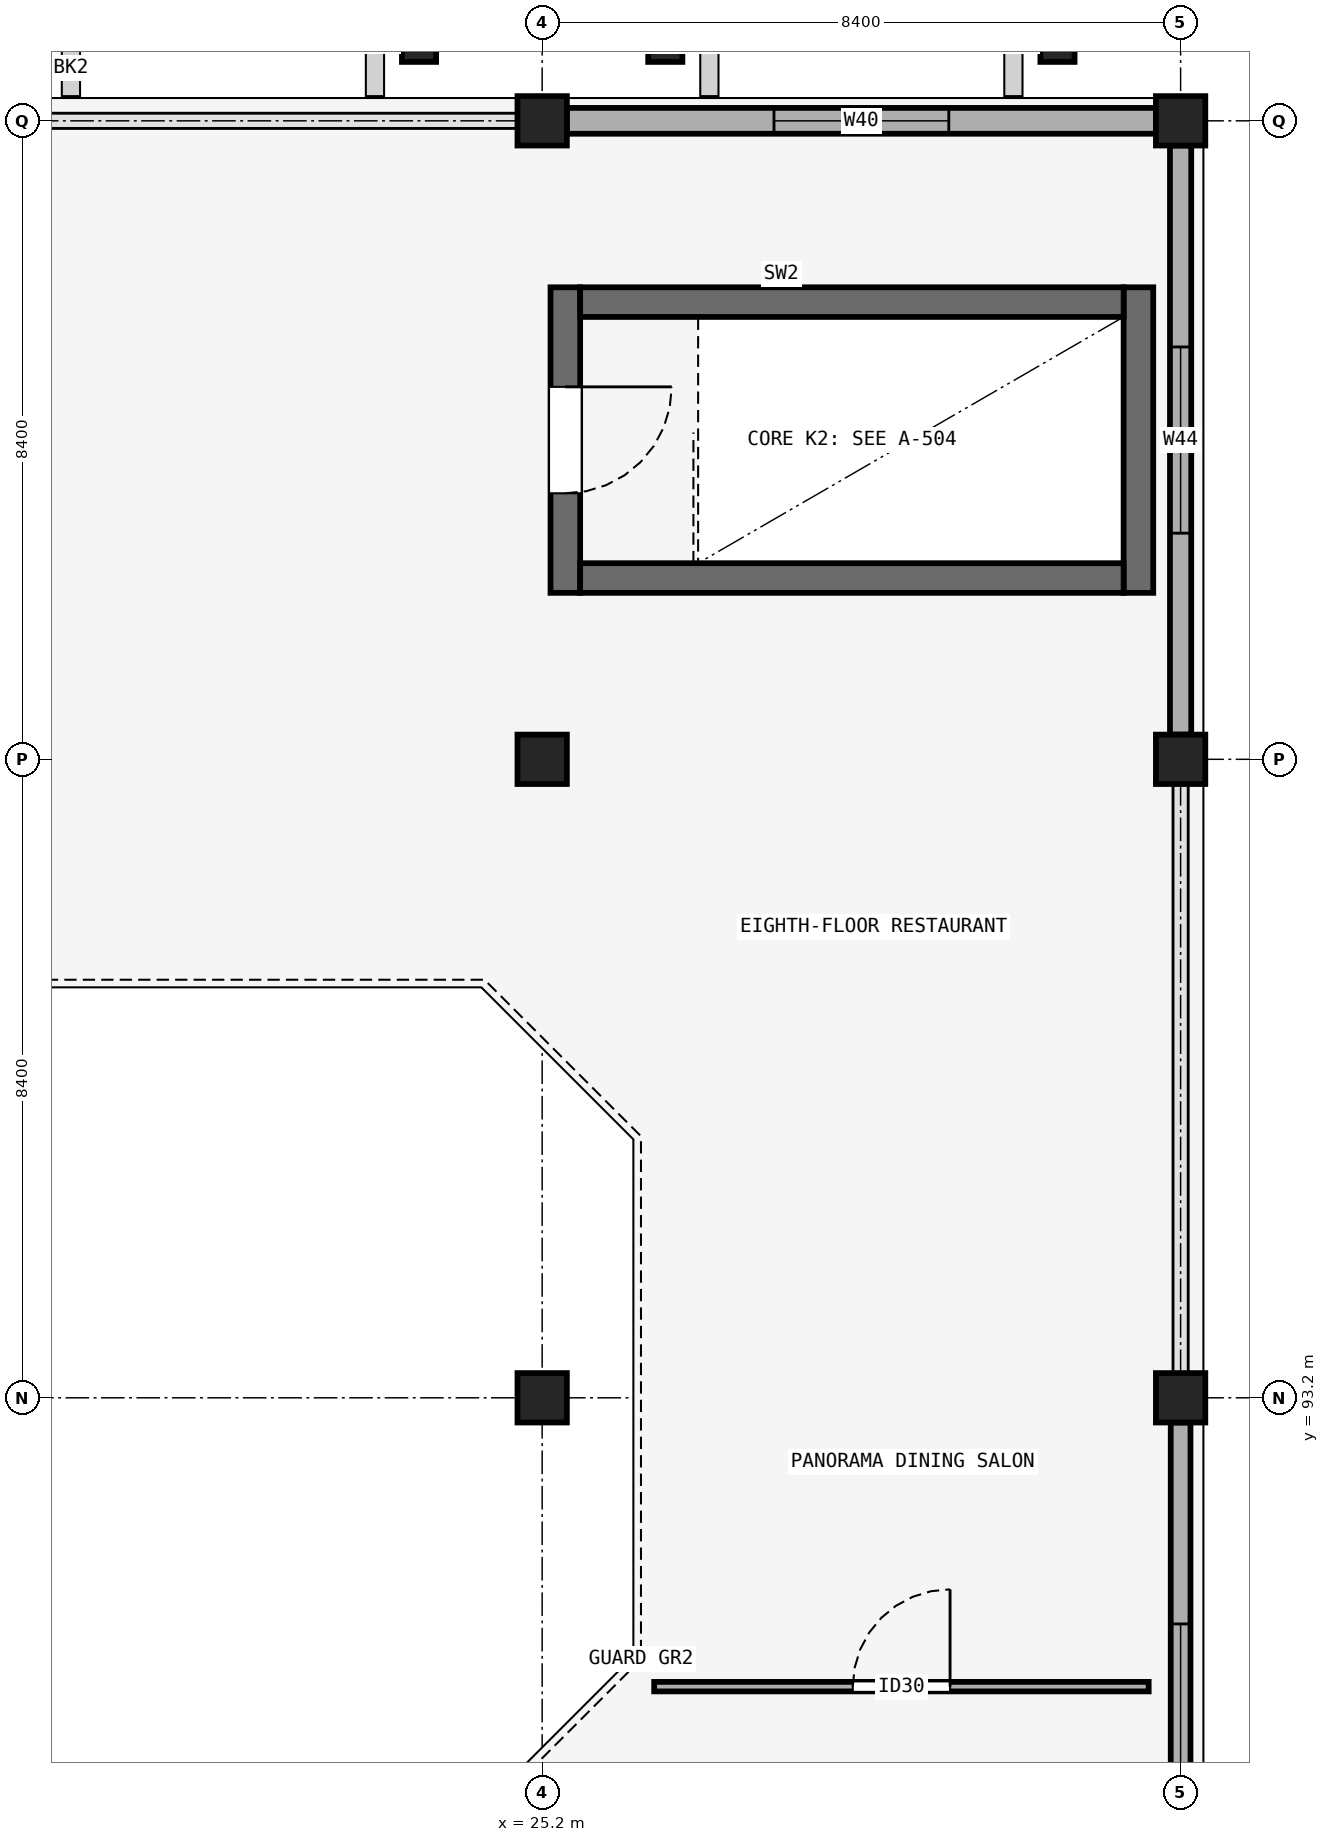
"""IFC4 building model, lengths in metres.
Left out: names, types, materials, properties, quantities, classifications, styles, units other than length and angle.
Written with IfcOpenShell. Run it as: python <this file> out.ifc"""

import sys

from ifc_helpers import new_model, si_unit, direction, frame, frame_2d, origin, origin_2d, place, context, subcontext, project, spatial, rectangle, extrude, element, fill, save


model = new_model("IFC4")
c1 = context("Model", 3, precision=1e-05, world=origin(), true_north=direction((0.0, 1.0)))
c2 = subcontext(c1, "Body", "Model", "MODEL_VIEW")
j1 = project(units=[si_unit("LENGTHUNIT", "METRE"), si_unit("PLANEANGLEUNIT", "RADIAN")], contexts=[c1])
p1 = place(None, origin())
s1 = spatial("IfcSite", under=j1, at=p1, CompositionType="ELEMENT")
p2 = place(p1, origin())
s2 = spatial("IfcBuilding", under=s1, at=p2, CompositionType="ELEMENT")
p3 = place(p2, frame((0.0, 0.0, 32.4)))
s3 = spatial("IfcBuildingStorey", under=s2, at=p3, CompositionType="ELEMENT", Elevation=32.4)
for number, where, z_axis, x_axis in (
    (1, (25.2, 93.2, 0.0), (0.0, 0.0, 1.0), (1.0, 0.0, 0.0)),
    (2, (33.6, 93.2, 0.0), (0.0, 0.0, 1.0), (1.0, 0.0, 0.0)),
    (3, (25.2, 101.6, 0.0), (0.0, 0.0, 1.0), (1.0, 0.0, 0.0)),
    (4, (33.6, 101.6, 0.0), (0.0, 0.0, 1.0), (1.0, 0.0, 0.0)),
    (5, (25.2, 110.0, 0.0), (0.0, 0.0, 1.0), (1.0, 0.0, 0.0)),
    (6, (33.6, 110.0, 0.0), (0.0, 0.0, 1.0), (1.0, 0.0, 0.0)),
):
    element("IfcColumn", number, at=place(p3, frame(where, z_axis=z_axis, x_axis=x_axis)), inside=s3, PredefinedType="COLUMN", context=c2, shape_type="SweptSolid", body=[
        extrude(rectangle(XDim=0.65, YDim=0.65, at=origin_2d()), origin(), (0.0, 0.0, 1.0), 4.5),
    ])
for number, where, z_axis, x_axis in (
    (7, (23.58, 111.05, 0.0), (0.0, 0.0, 1.0), (1.0, 0.0, 0.0)),
    (8, (26.82, 111.05, 0.0), (0.0, 0.0, 1.0), (1.0, 0.0, 0.0)),
    (9, (31.98, 111.05, 0.0), (0.0, 0.0, 1.0), (1.0, 0.0, 0.0)),
):
    element("IfcColumn", number, at=place(p3, frame(where, z_axis=z_axis, x_axis=x_axis)), inside=s3, PredefinedType="PILASTER", context=c2, shape_type="SweptSolid", body=[
        extrude(rectangle(XDim=0.45, YDim=0.55, at=origin_2d()), origin(), (0.0, 0.0, 1.0), 4.5),
    ])
p4 = place(p3, frame((25.525, 110.0, 0.0), z_axis=(0.0, 0.0, 1.0), x_axis=(1.0, 0.0, 0.0)))
e10 = element("IfcWall", 10, at=p4, inside=s3, PredefinedType="SOLIDWALL", context=c2, shape_type="SweptSolid", body=[
    extrude(rectangle(XDim=7.75, YDim=0.34, at=frame_2d((3.875, 0.0))), origin(), (0.0, 0.0, 1.0), 3.49),
])
p5 = place(p4, frame((2.725, 0.0, 0.95)))
e11 = element("IfcOpeningElement", 11, at=p5, cuts=e10, PredefinedType="OPENING", context=c2, shape_type="SweptSolid", body=[
    extrude(rectangle(XDim=2.3, YDim=2.1, at=frame_2d((1.15, 1.05))), frame((0.0, 0.18, 0.0), z_axis=(0.0, -1.0, 0.0), x_axis=(1.0, 0.0, 0.0)), (0.0, 0.0, 1.0), 0.36),
])
p6 = place(p3, frame((33.6, 85.125, 0.0), z_axis=(0.0, 0.0, 1.0), x_axis=(0.0, 1.0, 0.0)))
e12 = element("IfcWall", 12, at=p6, inside=s3, PredefinedType="SOLIDWALL", context=c2, shape_type="SweptSolid", body=[
    extrude(rectangle(XDim=7.75, YDim=0.26, at=frame_2d((3.875, 0.0))), origin(), (0.0, 0.0, 1.0), 3.49),
])
p7 = place(p6, frame((2.65, 0.0, 0.95)))
e13 = element("IfcOpeningElement", 13, at=p7, cuts=e12, PredefinedType="OPENING", context=c2, shape_type="SweptSolid", body=[
    extrude(rectangle(XDim=2.45, YDim=1.85, at=frame_2d((1.225, 0.925))), frame((0.0, 0.14, 0.0), z_axis=(0.0, -1.0, 0.0), x_axis=(1.0, 0.0, 0.0)), (0.0, 0.0, 1.0), 0.28),
])
p8 = place(p3, frame((33.6, 101.925, 0.0), z_axis=(0.0, 0.0, 1.0), x_axis=(0.0, 1.0, 0.0)))
e14 = element("IfcWall", 14, at=p8, inside=s3, PredefinedType="SOLIDWALL", context=c2, shape_type="SweptSolid", body=[
    extrude(rectangle(XDim=7.75, YDim=0.28, at=frame_2d((3.875, 0.0))), origin(), (0.0, 0.0, 1.0), 3.49),
])
p9 = place(p8, frame((2.65, 0.0, 0.95)))
e15 = element("IfcOpeningElement", 15, at=p9, cuts=e14, PredefinedType="OPENING", context=c2, shape_type="SweptSolid", body=[
    extrude(rectangle(XDim=2.45, YDim=2.1, at=frame_2d((1.225, 1.05))), frame((0.0, 0.15, 0.0), z_axis=(0.0, -1.0, 0.0), x_axis=(1.0, 0.0, 0.0)), (0.0, 0.0, 1.0), 0.3),
])
p10 = place(p3, frame((25.505, 107.81, 0.0), z_axis=(0.0, 0.0, 1.0), x_axis=(0.0, -1.0, 0.0)))
e16 = element("IfcWall", 16, at=p10, inside=s3, PredefinedType="SHEAR", context=c2, shape_type="SweptSolid", body=[
    extrude(rectangle(XDim=4.02, YDim=0.39, at=frame_2d((2.01, 0.0))), origin(), (0.0, 0.0, 1.0), 4.24),
])
p11 = place(p10, frame((1.31, 0.0, 0.0)))
e17 = element("IfcOpeningElement", 17, at=p11, cuts=e16, PredefinedType="OPENING", context=c2, shape_type="SweptSolid", body=[
    extrude(rectangle(XDim=1.4, YDim=2.15, at=frame_2d((0.7, 1.075))), frame((0.0, 0.205, 0.0), z_axis=(0.0, -1.0, 0.0), x_axis=(1.0, 0.0, 0.0)), (0.0, 0.0, 1.0), 0.41),
])
p12 = place(p3, frame((33.045, 103.79, 0.0), z_axis=(0.0, 0.0, 1.0), x_axis=(0.0, 1.0, 0.0)))
e18 = element("IfcWall", 18, at=p12, inside=s3, PredefinedType="SHEAR", context=c2, shape_type="SweptSolid", body=[
    extrude(rectangle(XDim=4.02, YDim=0.39, at=frame_2d((2.01, 0.0))), origin(), (0.0, 0.0, 1.0), 4.24),
])
for number, where, z_axis, x_axis in (
    (19, (25.7, 103.985, 0.0), (0.0, 0.0, 1.0), (1.0, 0.0, 0.0)),
    (20, (25.7, 107.615, 0.0), (0.0, 0.0, 1.0), (1.0, 0.0, 0.0)),
):
    element("IfcWall", number, at=place(p3, frame(where, z_axis=z_axis, x_axis=x_axis)), inside=s3, PredefinedType="SHEAR", context=c2, shape_type="SweptSolid", body=[
        extrude(rectangle(XDim=7.15, YDim=0.39, at=frame_2d((3.575, 0.0))), origin(), (0.0, 0.0, 1.0), 4.24),
    ])
p13 = place(p3, frame((26.674, 89.4, 0.0), z_axis=(0.0, 0.0, 1.0), x_axis=(1.0, 0.0, 0.0)))
e21 = element("IfcWall", 21, at=p13, inside=s3, PredefinedType="PARTITIONING", context=c2, shape_type="SweptSolid", body=[
    extrude(rectangle(XDim=6.506, YDim=0.125, at=frame_2d((3.253, 0.0))), origin(), (0.0, 0.0, 1.0), 4.24),
])
p14 = place(p13, frame((2.613, 0.0, 0.0)))
e22 = element("IfcOpeningElement", 22, at=p14, cuts=e21, PredefinedType="OPENING", context=c2, shape_type="SweptSolid", body=[
    extrude(rectangle(XDim=1.28, YDim=2.46, at=frame_2d((0.64, 1.23))), frame((0.0, 0.073, 0.0), z_axis=(0.0, -1.0, 0.0), x_axis=(1.0, 0.0, 0.0)), (0.0, 0.0, 1.0), 0.145),
])
p15 = place(p5, origin())
e23 = element("IfcWindow", 23, at=p15, inside=s3, PartitioningType="DOUBLE_PANEL_VERTICAL", PredefinedType="WINDOW", context=c2, shape_type="SweptSolid", body=[
    extrude(rectangle(XDim=2.3, YDim=2.1, at=frame_2d((1.15, 1.05))), frame((0.0, 0.03, 0.0), z_axis=(0.0, -1.0, 0.0), x_axis=(1.0, 0.0, 0.0)), (0.0, 0.0, 1.0), 0.06),
])
fill(e11, e23)
p16 = place(p7, origin())
e24 = element("IfcWindow", 24, at=p16, inside=s3, PartitioningType="DOUBLE_PANEL_VERTICAL", PredefinedType="WINDOW", context=c2, shape_type="SweptSolid", body=[
    extrude(rectangle(XDim=2.45, YDim=1.85, at=frame_2d((1.225, 0.925))), frame((0.0, 0.03, 0.0), z_axis=(0.0, -1.0, 0.0), x_axis=(1.0, 0.0, 0.0)), (0.0, 0.0, 1.0), 0.06),
])
fill(e13, e24)
p17 = place(p9, origin())
e25 = element("IfcWindow", 25, at=p17, inside=s3, PartitioningType="DOUBLE_PANEL_VERTICAL", PredefinedType="WINDOW", context=c2, shape_type="SweptSolid", body=[
    extrude(rectangle(XDim=2.45, YDim=2.1, at=frame_2d((1.225, 1.05))), frame((0.0, 0.03, 0.0), z_axis=(0.0, -1.0, 0.0), x_axis=(1.0, 0.0, 0.0)), (0.0, 0.0, 1.0), 0.06),
])
fill(e15, e25)
p18 = place(p11, origin())
e26 = element("IfcDoor", 26, at=p18, inside=s3, OperationType="SINGLE_SWING_LEFT", PredefinedType="DOOR", context=c2, shape_type="SweptSolid", body=[
    extrude(rectangle(XDim=1.4, YDim=2.15, at=frame_2d((0.7, 1.075))), frame((0.0, 0.025, 0.0), z_axis=(0.0, -1.0, 0.0), x_axis=(1.0, 0.0, 0.0)), (0.0, 0.0, 1.0), 0.05),
])
fill(e17, e26)
p19 = place(p14, origin())
e27 = element("IfcDoor", 27, at=p19, inside=s3, OperationType="SINGLE_SWING_RIGHT", PredefinedType="DOOR", context=c2, shape_type="SweptSolid", body=[
    extrude(rectangle(XDim=1.28, YDim=2.46, at=frame_2d((0.64, 1.23))), frame((0.0, 0.025, 0.0), z_axis=(0.0, -1.0, 0.0), x_axis=(1.0, 0.0, 0.0)), (0.0, 0.0, 1.0), 0.05),
])
fill(e22, e27)
save(model, sys.argv[1])
